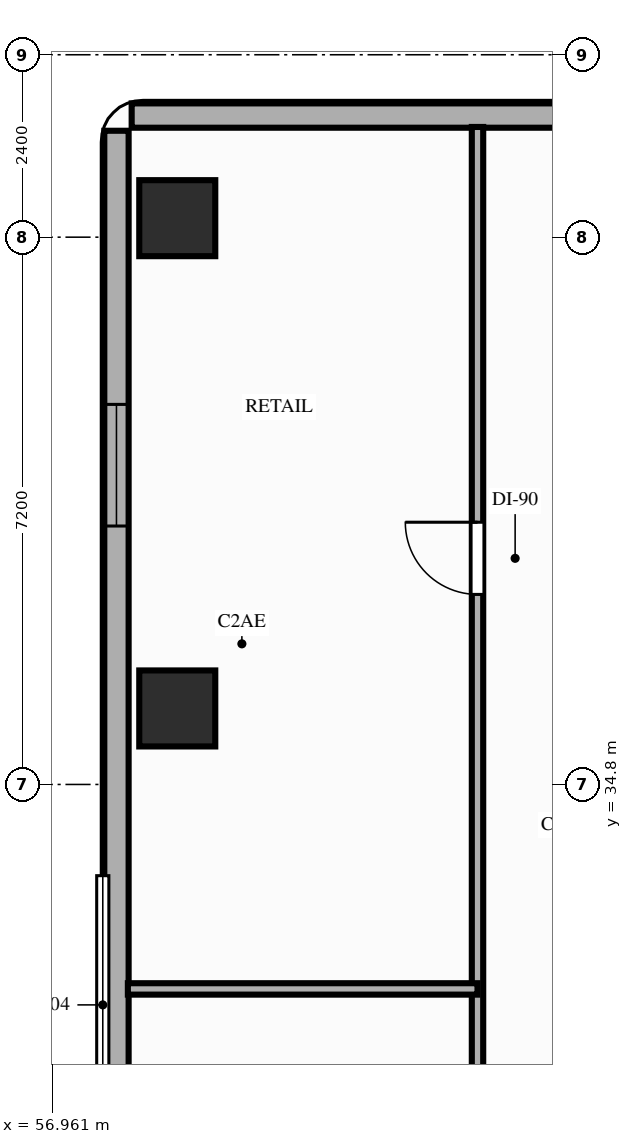
"""IFC4 building model, lengths in metres.
Left out: names, types, materials, properties, quantities, classifications, styles, units other than length and angle.
Written with IfcOpenShell. Run it as: python <this file> out.ifc"""

import sys

from ifc_helpers import new_model, si_unit, direction, frame, frame_2d, origin, origin_2d, place, context, subcontext, project, spatial, rectangle, extrude, element, fill, save


model = new_model("IFC4")
c1 = context("Model", 3, precision=1e-05, world=origin(), true_north=direction((0.0, 1.0)))
c2 = subcontext(c1, "Body", "Model", "MODEL_VIEW")
j1 = project(units=[si_unit("LENGTHUNIT", "METRE"), si_unit("PLANEANGLEUNIT", "RADIAN")], contexts=[c1])
p1 = place(None, origin())
s1 = spatial("IfcSite", under=j1, at=p1, CompositionType="ELEMENT")
p2 = place(p1, origin())
s2 = spatial("IfcBuilding", under=s1, at=p2, CompositionType="ELEMENT")
p3 = place(p2, frame((0.0, 0.0, 46.8)))
s3 = spatial("IfcBuildingStorey", under=s2, at=p3, CompositionType="ELEMENT", Elevation=46.8)
for number, where, z_axis, x_axis in (
    (1, (58.6, 35.8, 0.0), (0.0, 0.0, 1.0), (1.0, 0.0, 0.0)),
    (2, (58.6, 42.25, 0.0), (0.0, 0.0, 1.0), (1.0, 0.0, 0.0)),
):
    element("IfcColumn", number, at=place(p3, frame(where, z_axis=z_axis, x_axis=x_axis)), inside=s3, PredefinedType="COLUMN", context=c2, shape_type="SweptSolid", body=[
        extrude(rectangle(XDim=1.0, YDim=1.0, at=origin_2d()), origin(), (0.0, 0.0, 1.0), 3.2),
    ])
p4 = place(p3, frame((57.8, 43.4, 0.0), z_axis=(0.0, 0.0, 1.0), x_axis=(0.0, -1.0, 0.0)))
e3 = element("IfcWall", 3, at=p4, inside=s3, PredefinedType="STANDARD", context=c2, shape_type="SweptSolid", body=[
    extrude(rectangle(XDim=22.6, YDim=0.32, at=frame_2d((11.3, 0.0))), origin(), (0.0, 0.0, 1.0), 2.5),
])
p5 = place(p4, frame((3.6, 0.0, 0.85)))
e4 = element("IfcOpeningElement", 4, at=p5, cuts=e3, PredefinedType="OPENING", context=c2, shape_type="SweptSolid", body=[
    extrude(rectangle(XDim=1.6, YDim=1.35, at=frame_2d((0.8, 0.675))), frame((0.0, 0.17, 0.0), z_axis=(0.0, -1.0, 0.0), x_axis=(1.0, 0.0, 0.0)), (0.0, 0.0, 1.0), 0.34),
])
p6 = place(p3, frame((72.8, 43.6, 0.0), z_axis=(0.0, 0.0, 1.0), x_axis=(-1.0, 0.0, 0.0)))
e5 = element("IfcWall", 5, at=p6, inside=s3, PredefinedType="STANDARD", context=c2, shape_type="SweptSolid", body=[
    extrude(rectangle(XDim=14.8, YDim=0.32, at=frame_2d((7.4, 0.0))), origin(), (0.0, 0.0, 1.0), 3.02),
])
p7 = place(p3, frame((62.55, 20.75, 0.0), z_axis=(0.0, 0.0, 1.0), x_axis=(0.0, 1.0, 0.0)))
e6 = element("IfcWall", 6, at=p7, inside=s3, PredefinedType="PARTITIONING", context=c2, shape_type="SweptSolid", body=[
    extrude(rectangle(XDim=22.7, YDim=0.15, at=frame_2d((11.35, 0.0))), origin(), (0.0, 0.0, 1.0), 2.5),
])
p8 = place(p7, frame((1.05, 0.0, 0.0)))
e7 = element("IfcOpeningElement", 7, at=p8, cuts=e6, PredefinedType="OPENING", context=c2, shape_type="SweptSolid", body=[
    extrude(rectangle(XDim=0.85, YDim=2.1, at=frame_2d((0.425, 1.05))), frame((0.0, 0.085, 0.0), z_axis=(0.0, -1.0, 0.0), x_axis=(1.0, 0.0, 0.0)), (0.0, 0.0, 1.0), 0.17),
])
p9 = place(p7, frame((3.43, 0.0, 0.0)))
e8 = element("IfcOpeningElement", 8, at=p9, cuts=e6, PredefinedType="OPENING", context=c2, shape_type="SweptSolid", body=[
    extrude(rectangle(XDim=0.95, YDim=2.1, at=frame_2d((0.475, 1.05))), frame((0.0, 0.085, 0.0), z_axis=(0.0, -1.0, 0.0), x_axis=(1.0, 0.0, 0.0)), (0.0, 0.0, 1.0), 0.17),
])
p10 = place(p7, frame((8.15, 0.0, 0.0)))
e9 = element("IfcOpeningElement", 9, at=p10, cuts=e6, PredefinedType="OPENING", context=c2, shape_type="SweptSolid", body=[
    extrude(rectangle(XDim=0.95, YDim=2.15, at=frame_2d((0.475, 1.075))), frame((0.0, 0.085, 0.0), z_axis=(0.0, -1.0, 0.0), x_axis=(1.0, 0.0, 0.0)), (0.0, 0.0, 1.0), 0.17),
])
p11 = place(p7, frame((16.55, 0.0, 0.0)))
e10 = element("IfcOpeningElement", 10, at=p11, cuts=e6, PredefinedType="OPENING", context=c2, shape_type="SweptSolid", body=[
    extrude(rectangle(XDim=0.95, YDim=2.15, at=frame_2d((0.475, 1.075))), frame((0.0, 0.085, 0.0), z_axis=(0.0, -1.0, 0.0), x_axis=(1.0, 0.0, 0.0)), (0.0, 0.0, 1.0), 0.17),
])
p12 = place(p3, frame((57.95, 32.11, 0.0), z_axis=(0.0, 0.0, 1.0), x_axis=(1.0, 0.0, 0.0)))
e11 = element("IfcWall", 11, at=p12, inside=s3, PredefinedType="PARTITIONING", context=c2, shape_type="SweptSolid", body=[
    extrude(rectangle(XDim=4.6, YDim=0.15, at=frame_2d((2.3, 0.0))), origin(), (0.0, 0.0, 1.0), 2.5),
])
p13 = place(p5, origin())
e12 = element("IfcWindow", 12, at=p13, inside=s3, PartitioningType="SINGLE_PANEL", PredefinedType="WINDOW", context=c2, shape_type="SweptSolid", body=[
    extrude(rectangle(XDim=1.6, YDim=1.35, at=frame_2d((0.8, 0.675))), frame((0.0, 0.03, 0.0), z_axis=(0.0, -1.0, 0.0), x_axis=(1.0, 0.0, 0.0)), (0.0, 0.0, 1.0), 0.06),
])
fill(e4, e12)
p14 = place(p11, origin())
e13 = element("IfcDoor", 13, at=p14, inside=s3, OperationType="SINGLE_SWING_RIGHT", PredefinedType="DOOR", context=c2, shape_type="SweptSolid", body=[
    extrude(rectangle(XDim=0.95, YDim=2.15, at=frame_2d((0.475, 1.075))), frame((0.0, 0.025, 0.0), z_axis=(0.0, -1.0, 0.0), x_axis=(1.0, 0.0, 0.0)), (0.0, 0.0, 1.0), 0.05),
])
fill(e10, e13)
save(model, sys.argv[1])
